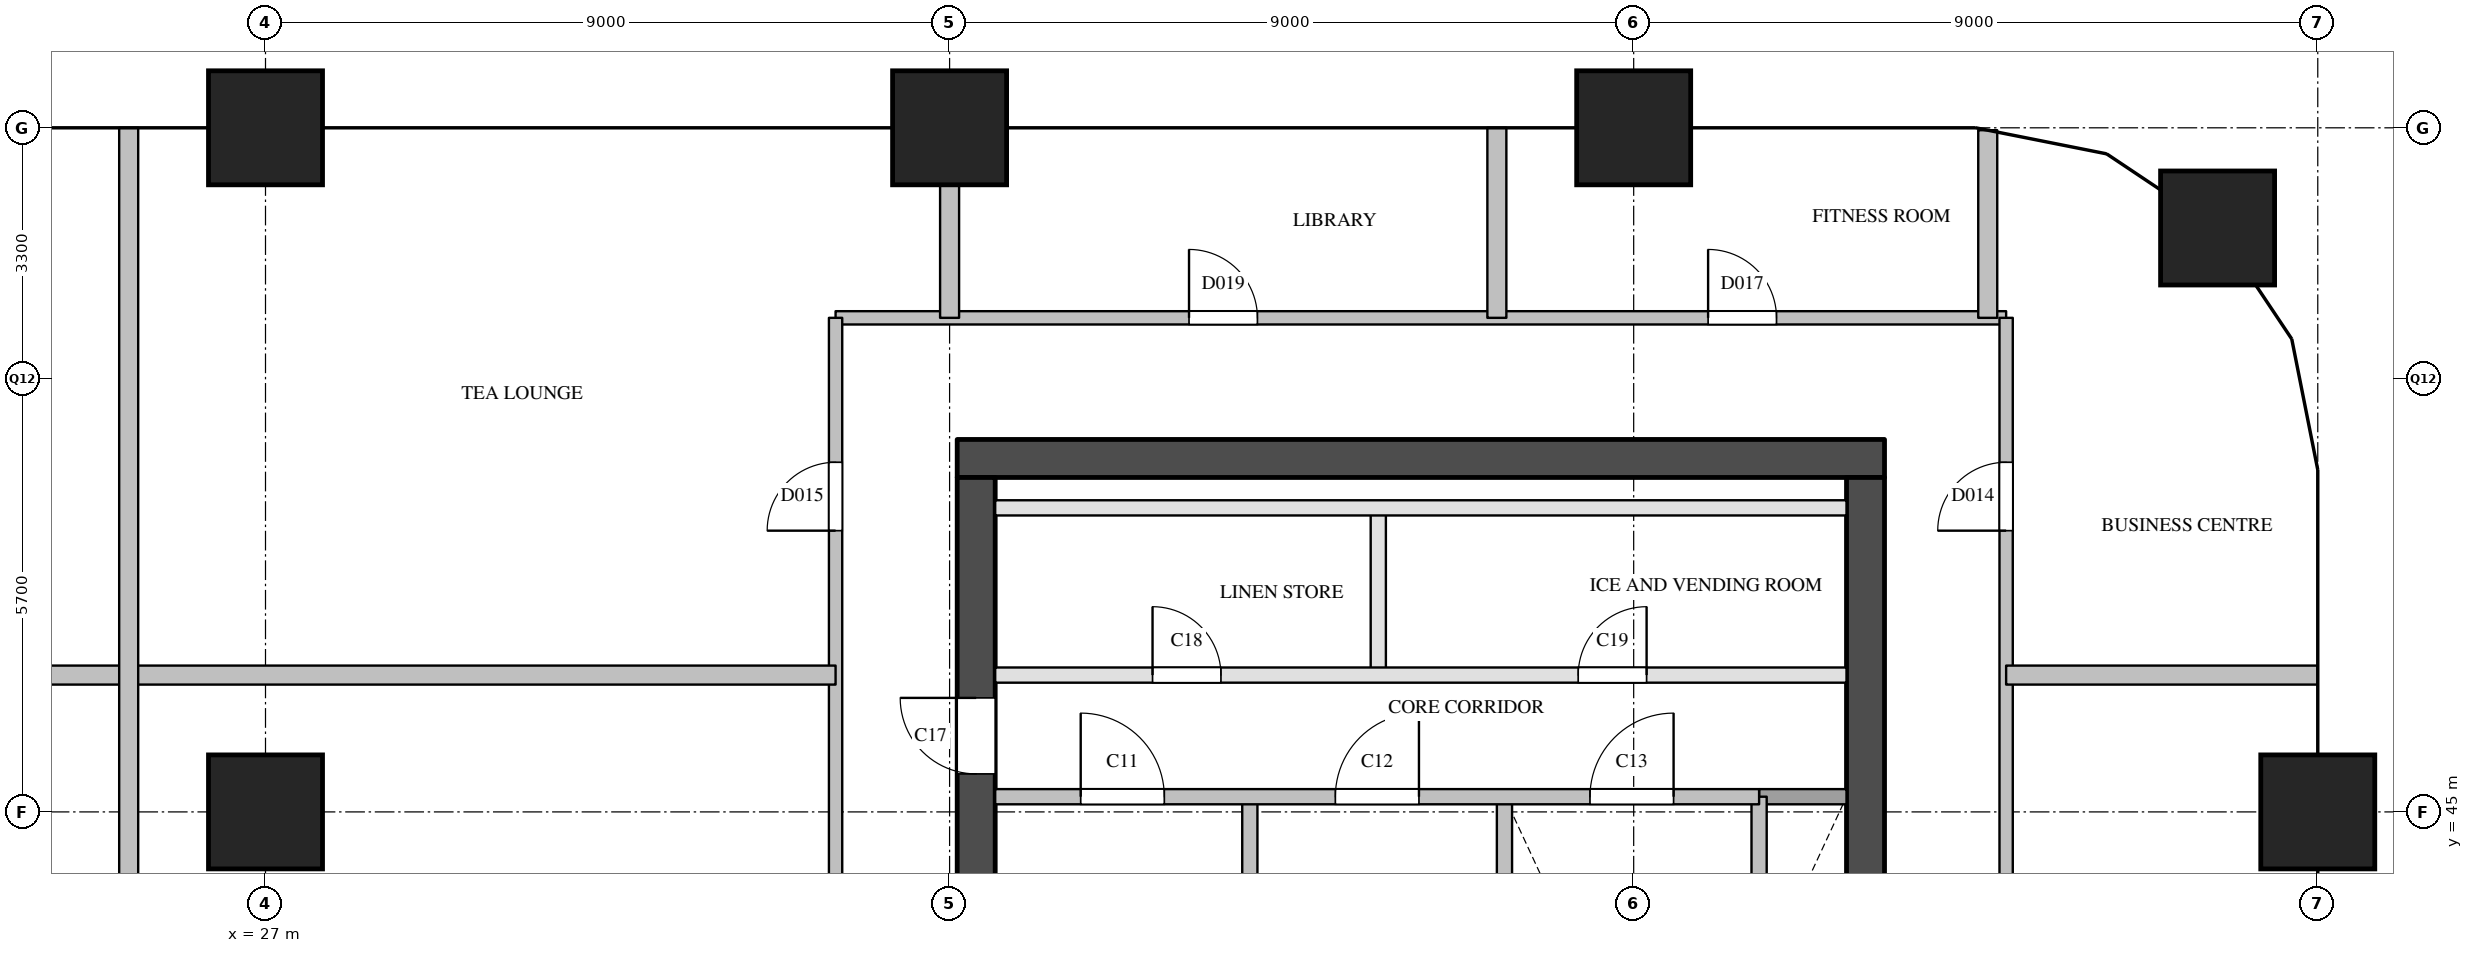
"""IFC4 building model, lengths in metres.
Left out: names, types, materials, properties, quantities, classifications, styles, units other than length and angle.
Written with IfcOpenShell. Run it as: python <this file> out.ifc"""

import sys

from ifc_helpers import new_model, si_unit, direction, frame, frame_2d, origin, origin_2d, place, context, subcontext, project, spatial, rectangle, extrude, element, fill, save


model = new_model("IFC4")
c1 = context("Model", 3, precision=1e-05, world=origin(), true_north=direction((0.0, 1.0)))
c2 = subcontext(c1, "Body", "Model", "MODEL_VIEW")
j1 = project(units=[si_unit("LENGTHUNIT", "METRE"), si_unit("PLANEANGLEUNIT", "RADIAN")], contexts=[c1])
p1 = place(None, origin())
s1 = spatial("IfcSite", under=j1, at=p1, CompositionType="ELEMENT")
p2 = place(p1, origin())
s2 = spatial("IfcBuilding", under=s1, at=p2, CompositionType="ELEMENT")
p3 = place(p2, frame((0.0, 0.0, 146.6)))
s3 = spatial("IfcBuildingStorey", under=s2, at=p3, CompositionType="ELEMENT", Elevation=146.6)
for number, where, z_axis, x_axis in (
    (1, (27.0, 45.0, 0.0), (0.0, 0.0, 1.0), (1.0, 0.0, 0.0)),
    (2, (27.0, 54.0, 0.0), (0.0, 0.0, 1.0), (1.0, 0.0, 0.0)),
    (3, (36.0, 54.0, 0.0), (0.0, 0.0, 1.0), (1.0, 0.0, 0.0)),
    (4, (45.0, 54.0, 0.0), (0.0, 0.0, 1.0), (1.0, 0.0, 0.0)),
    (5, (54.0, 45.0, 0.0), (0.0, 0.0, 1.0), (1.0, 0.0, 0.0)),
    (6, (52.682, 52.682, 0.0), (0.0, 0.0, 1.0), (1.0, 0.0, 0.0)),
):
    element("IfcColumn", number, at=place(p3, frame(where, z_axis=z_axis, x_axis=x_axis)), inside=s3, PredefinedType="COLUMN", context=c2, shape_type="SweptSolid", body=[
        extrude(rectangle(XDim=1.5, YDim=1.5, at=origin_2d()), origin(), (0.0, 0.0, 1.0), 3.9),
    ])
p4 = place(p3, frame((36.1, 49.65, 0.0), z_axis=(0.0, 0.0, 1.0), x_axis=(1.0, 0.0, 0.0)))
e7 = element("IfcWall", 7, at=p4, inside=s3, PredefinedType="SHEAR", context=c2, shape_type="SweptSolid", body=[
    extrude(rectangle(XDim=12.2, YDim=0.5, at=frame_2d((6.1, 0.0))), origin(), (0.0, 0.0, 1.0), 3.6),
])
p5 = place(p3, frame((36.35, 29.1, 0.0), z_axis=(0.0, 0.0, 1.0), x_axis=(0.0, 1.0, 0.0)))
e8 = element("IfcWall", 8, at=p5, inside=s3, PredefinedType="SHEAR", context=c2, shape_type="SweptSolid", body=[
    extrude(rectangle(XDim=20.3, YDim=0.5, at=frame_2d((10.15, 0.0))), origin(), (0.0, 0.0, 1.0), 3.6),
])
p6 = place(p5, frame((3.6, 0.0, 0.0)))
e9 = element("IfcOpeningElement", 9, at=p6, cuts=e8, PredefinedType="OPENING", context=c2, shape_type="SweptSolid", body=[
    extrude(rectangle(XDim=1.8, YDim=2.1, at=frame_2d((0.9, 1.05))), frame((0.0, 0.26, 0.0), z_axis=(0.0, -1.0, 0.0), x_axis=(1.0, 0.0, 0.0)), (0.0, 0.0, 1.0), 0.52),
])
p7 = place(p5, frame((16.4, 0.0, 0.0)))
e10 = element("IfcOpeningElement", 10, at=p7, cuts=e8, PredefinedType="OPENING", context=c2, shape_type="SweptSolid", body=[
    extrude(rectangle(XDim=1.0, YDim=2.1, at=frame_2d((0.5, 1.05))), frame((0.0, 0.26, 0.0), z_axis=(0.0, -1.0, 0.0), x_axis=(1.0, 0.0, 0.0)), (0.0, 0.0, 1.0), 0.52),
])
p8 = place(p3, frame((48.05, 29.1, 0.0), z_axis=(0.0, 0.0, 1.0), x_axis=(0.0, 1.0, 0.0)))
e11 = element("IfcWall", 11, at=p8, inside=s3, PredefinedType="SHEAR", context=c2, shape_type="SweptSolid", body=[
    extrude(rectangle(XDim=20.3, YDim=0.5, at=frame_2d((10.15, 0.0))), origin(), (0.0, 0.0, 1.0), 3.6),
])
p9 = place(p8, frame((12.5, 0.0, 0.0)))
e12 = element("IfcOpeningElement", 12, at=p9, cuts=e11, PredefinedType="OPENING", context=c2, shape_type="SweptSolid", body=[
    extrude(rectangle(XDim=0.7, YDim=2.1, at=frame_2d((0.35, 1.05))), frame((0.0, 0.26, 0.0), z_axis=(0.0, -1.0, 0.0), x_axis=(1.0, 0.0, 0.0)), (0.0, 0.0, 1.0), 0.52),
])
p10 = place(p8, frame((3.9, 0.0, 0.0)))
e13 = element("IfcOpeningElement", 13, at=p10, cuts=e11, PredefinedType="OPENING", context=c2, shape_type="SweptSolid", body=[
    extrude(rectangle(XDim=1.8, YDim=2.1, at=frame_2d((0.9, 1.05))), frame((0.0, 0.26, 0.0), z_axis=(0.0, -1.0, 0.0), x_axis=(1.0, 0.0, 0.0)), (0.0, 0.0, 1.0), 0.52),
])
p11 = place(p3, frame((39.95, 40.78, 0.0), z_axis=(0.0, 0.0, 1.0), x_axis=(0.0, 1.0, 0.0)))
e14 = element("IfcWall", 14, at=p11, inside=s3, PredefinedType="SOLIDWALL", context=c2, shape_type="SweptSolid", body=[
    extrude(rectangle(XDim=4.42, YDim=0.2, at=frame_2d((2.21, 0.0))), origin(), (0.0, 0.0, 1.0), 3.6),
])
p12 = place(p3, frame((41.64, 46.8, 0.0), z_axis=(0.0, 0.0, 1.0), x_axis=(0.0, 1.0, 0.0)))
e15 = element("IfcWall", 15, at=p12, inside=s3, PredefinedType="PARTITIONING", context=c2, shape_type="SweptSolid", body=[
    extrude(rectangle(XDim=2.2, YDim=0.2, at=frame_2d((1.1, 0.0))), origin(), (0.0, 0.0, 1.0), 3.6),
])
for number, where, z_axis, x_axis in (
    (16, (43.3, 40.78, 0.0), (0.0, 0.0, 1.0), (0.0, 1.0, 0.0)),
    (17, (46.65, 40.78, 0.0), (0.0, 0.0, 1.0), (0.0, 1.0, 0.0)),
):
    element("IfcWall", number, at=place(p3, frame(where, z_axis=z_axis, x_axis=x_axis)), inside=s3, PredefinedType="SOLIDWALL", context=c2, shape_type="SweptSolid", body=[
        extrude(rectangle(XDim=4.42, YDim=0.2, at=frame_2d((2.21, 0.0))), origin(), (0.0, 0.0, 1.0), 3.6),
    ])
p13 = place(p3, frame((46.65, 45.2, 0.0), z_axis=(0.0, 0.0, 1.0), x_axis=(1.0, 0.0, 0.0)))
e18 = element("IfcWall", 18, at=p13, inside=s3, PredefinedType="SOLIDWALL", context=c2, shape_type="SweptSolid", body=[
    extrude(rectangle(XDim=1.15, YDim=0.2, at=frame_2d((0.575, 0.0))), origin(), (0.0, 0.0, 1.0), 3.6),
])
p14 = place(p3, frame((36.6, 45.2, 0.0), z_axis=(0.0, 0.0, 1.0), x_axis=(1.0, 0.0, 0.0)))
e19 = element("IfcWall", 19, at=p14, inside=s3, PredefinedType="SOLIDWALL", context=c2, shape_type="SweptSolid", body=[
    extrude(rectangle(XDim=10.05, YDim=0.2, at=frame_2d((5.025, 0.0))), origin(), (0.0, 0.0, 1.0), 3.6),
])
p15 = place(p14, frame((1.125, 0.0, 0.0)))
e20 = element("IfcOpeningElement", 20, at=p15, cuts=e19, PredefinedType="OPENING", context=c2, shape_type="SweptSolid", body=[
    extrude(rectangle(XDim=1.1, YDim=2.1, at=frame_2d((0.55, 1.05))), frame((0.0, 0.11, 0.0), z_axis=(0.0, -1.0, 0.0), x_axis=(1.0, 0.0, 0.0)), (0.0, 0.0, 1.0), 0.22),
])
p16 = place(p14, frame((4.475, 0.0, 0.0)))
e21 = element("IfcOpeningElement", 21, at=p16, cuts=e19, PredefinedType="OPENING", context=c2, shape_type="SweptSolid", body=[
    extrude(rectangle(XDim=1.1, YDim=2.1, at=frame_2d((0.55, 1.05))), frame((0.0, 0.11, 0.0), z_axis=(0.0, -1.0, 0.0), x_axis=(1.0, 0.0, 0.0)), (0.0, 0.0, 1.0), 0.22),
])
p17 = place(p14, frame((7.825, 0.0, 0.0)))
e22 = element("IfcOpeningElement", 22, at=p17, cuts=e19, PredefinedType="OPENING", context=c2, shape_type="SweptSolid", body=[
    extrude(rectangle(XDim=1.1, YDim=2.1, at=frame_2d((0.55, 1.05))), frame((0.0, 0.11, 0.0), z_axis=(0.0, -1.0, 0.0), x_axis=(1.0, 0.0, 0.0)), (0.0, 0.0, 1.0), 0.22),
])
p18 = place(p3, frame((36.6, 46.8, 0.0), z_axis=(0.0, 0.0, 1.0), x_axis=(1.0, 0.0, 0.0)))
e23 = element("IfcWall", 23, at=p18, inside=s3, PredefinedType="PARTITIONING", context=c2, shape_type="SweptSolid", body=[
    extrude(rectangle(XDim=11.2, YDim=0.2, at=frame_2d((5.6, 0.0))), origin(), (0.0, 0.0, 1.0), 3.6),
])
p19 = place(p18, frame((2.07, 0.0, 0.0)))
e24 = element("IfcOpeningElement", 24, at=p19, cuts=e23, PredefinedType="OPENING", context=c2, shape_type="SweptSolid", body=[
    extrude(rectangle(XDim=0.9, YDim=2.1, at=frame_2d((0.45, 1.05))), frame((0.0, 0.11, 0.0), z_axis=(0.0, -1.0, 0.0), x_axis=(1.0, 0.0, 0.0)), (0.0, 0.0, 1.0), 0.22),
])
p20 = place(p18, frame((7.67, 0.0, 0.0)))
e25 = element("IfcOpeningElement", 25, at=p20, cuts=e23, PredefinedType="OPENING", context=c2, shape_type="SweptSolid", body=[
    extrude(rectangle(XDim=0.9, YDim=2.1, at=frame_2d((0.45, 1.05))), frame((0.0, 0.11, 0.0), z_axis=(0.0, -1.0, 0.0), x_axis=(1.0, 0.0, 0.0)), (0.0, 0.0, 1.0), 0.22),
])
p21 = place(p3, frame((36.6, 49.0, 0.0), z_axis=(0.0, 0.0, 1.0), x_axis=(1.0, 0.0, 0.0)))
e26 = element("IfcWall", 26, at=p21, inside=s3, PredefinedType="PARTITIONING", context=c2, shape_type="SweptSolid", body=[
    extrude(rectangle(XDim=11.2, YDim=0.2, at=frame_2d((5.6, 0.0))), origin(), (0.0, 0.0, 1.0), 3.6),
])
p22 = place(p3, frame((34.5, 51.5, 0.0), z_axis=(0.0, 0.0, 1.0), x_axis=(1.0, 0.0, 0.0)))
e27 = element("IfcWall", 27, at=p22, inside=s3, PredefinedType="PARTITIONING", context=c2, shape_type="SweptSolid", body=[
    extrude(rectangle(XDim=15.4, YDim=0.175, at=frame_2d((7.7, 0.0))), origin(), (0.0, 0.0, 1.0), 3.6),
])
p23 = place(p22, frame((11.479, 0.0, 0.0)))
e28 = element("IfcOpeningElement", 28, at=p23, cuts=e27, PredefinedType="OPENING", context=c2, shape_type="SweptSolid", body=[
    extrude(rectangle(XDim=0.9, YDim=2.1, at=frame_2d((0.45, 1.05))), frame((0.0, 0.097, 0.0), z_axis=(0.0, -1.0, 0.0), x_axis=(1.0, 0.0, 0.0)), (0.0, 0.0, 1.0), 0.195),
])
p24 = place(p22, frame((4.65, 0.0, 0.0)))
e29 = element("IfcOpeningElement", 29, at=p24, cuts=e27, PredefinedType="OPENING", context=c2, shape_type="SweptSolid", body=[
    extrude(rectangle(XDim=0.9, YDim=2.1, at=frame_2d((0.45, 1.05))), frame((0.0, 0.097, 0.0), z_axis=(0.0, -1.0, 0.0), x_axis=(1.0, 0.0, 0.0)), (0.0, 0.0, 1.0), 0.195),
])
p25 = place(p3, frame((34.5, 38.7, 0.0), z_axis=(0.0, 0.0, 1.0), x_axis=(0.0, 1.0, 0.0)))
e30 = element("IfcWall", 30, at=p25, inside=s3, PredefinedType="PARTITIONING", context=c2, shape_type="SweptSolid", body=[
    extrude(rectangle(XDim=12.8, YDim=0.175, at=frame_2d((6.4, 0.0))), origin(), (0.0, 0.0, 1.0), 3.6),
])
p26 = place(p25, frame((10.0, 0.0, 0.0)))
e31 = element("IfcOpeningElement", 31, at=p26, cuts=e30, PredefinedType="OPENING", context=c2, shape_type="SweptSolid", body=[
    extrude(rectangle(XDim=0.9, YDim=2.1, at=frame_2d((0.45, 1.05))), frame((0.0, 0.097, 0.0), z_axis=(0.0, -1.0, 0.0), x_axis=(1.0, 0.0, 0.0)), (0.0, 0.0, 1.0), 0.195),
])
p27 = place(p3, frame((49.9, 28.5, 0.0), z_axis=(0.0, 0.0, 1.0), x_axis=(0.0, 1.0, 0.0)))
e32 = element("IfcWall", 32, at=p27, inside=s3, PredefinedType="PARTITIONING", context=c2, shape_type="SweptSolid", body=[
    extrude(rectangle(XDim=23.0, YDim=0.175, at=frame_2d((11.5, 0.0))), origin(), (0.0, 0.0, 1.0), 3.6),
])
p28 = place(p27, frame((3.3, 0.0, 0.0)))
e33 = element("IfcOpeningElement", 33, at=p28, cuts=e32, PredefinedType="OPENING", context=c2, shape_type="SweptSolid", body=[
    extrude(rectangle(XDim=0.9, YDim=2.1, at=frame_2d((0.45, 1.05))), frame((0.0, 0.097, 0.0), z_axis=(0.0, -1.0, 0.0), x_axis=(1.0, 0.0, 0.0)), (0.0, 0.0, 1.0), 0.195),
])
p29 = place(p27, frame((12.45, 0.0, 0.0)))
e34 = element("IfcOpeningElement", 34, at=p29, cuts=e32, PredefinedType="OPENING", context=c2, shape_type="SweptSolid", body=[
    extrude(rectangle(XDim=0.9, YDim=2.1, at=frame_2d((0.45, 1.05))), frame((0.0, 0.097, 0.0), z_axis=(0.0, -1.0, 0.0), x_axis=(1.0, 0.0, 0.0)), (0.0, 0.0, 1.0), 0.195),
])
p30 = place(p27, frame((20.2, 0.0, 0.0)))
e35 = element("IfcOpeningElement", 35, at=p30, cuts=e32, PredefinedType="OPENING", context=c2, shape_type="SweptSolid", body=[
    extrude(rectangle(XDim=0.9, YDim=2.1, at=frame_2d((0.45, 1.05))), frame((0.0, 0.097, 0.0), z_axis=(0.0, -1.0, 0.0), x_axis=(1.0, 0.0, 0.0)), (0.0, 0.0, 1.0), 0.195),
])
p31 = place(p3, frame((19.5, 46.8, 0.0), z_axis=(0.0, 0.0, 1.0), x_axis=(1.0, 0.0, 0.0)))
e36 = element("IfcWall", 36, at=p31, inside=s3, PredefinedType="PARTITIONING", context=c2, shape_type="SweptSolid", body=[
    extrude(rectangle(XDim=15.0, YDim=0.25, at=frame_2d((7.5, 0.0))), origin(), (0.0, 0.0, 1.0), 2.6),
])
p32 = place(p3, frame((49.9, 46.8, 0.0), z_axis=(0.0, 0.0, 1.0), x_axis=(1.0, 0.0, 0.0)))
e37 = element("IfcWall", 37, at=p32, inside=s3, PredefinedType="PARTITIONING", context=c2, shape_type="SweptSolid", body=[
    extrude(rectangle(XDim=4.1, YDim=0.25, at=frame_2d((2.05, 0.0))), origin(), (0.0, 0.0, 1.0), 2.6),
])
p33 = place(p3, frame((25.2, 38.7, 0.0), z_axis=(0.0, 0.0, 1.0), x_axis=(0.0, 1.0, 0.0)))
e38 = element("IfcWall", 38, at=p33, inside=s3, PredefinedType="PARTITIONING", context=c2, shape_type="SweptSolid", body=[
    extrude(rectangle(XDim=15.3, YDim=0.25, at=frame_2d((7.65, 0.0))), origin(), (0.0, 0.0, 1.0), 2.6),
])
p34 = place(p3, frame((36.0, 51.5, 0.0), z_axis=(0.0, 0.0, 1.0), x_axis=(0.0, 1.0, 0.0)))
e39 = element("IfcWall", 39, at=p34, inside=s3, PredefinedType="PARTITIONING", context=c2, shape_type="SweptSolid", body=[
    extrude(rectangle(XDim=2.5, YDim=0.25, at=frame_2d((1.25, 0.0))), origin(), (0.0, 0.0, 1.0), 3.6),
])
p35 = place(p3, frame((43.2, 51.5, 0.0), z_axis=(0.0, 0.0, 1.0), x_axis=(0.0, 1.0, 0.0)))
e40 = element("IfcWall", 40, at=p35, inside=s3, PredefinedType="PARTITIONING", context=c2, shape_type="SweptSolid", body=[
    extrude(rectangle(XDim=2.5, YDim=0.25, at=frame_2d((1.25, 0.0))), origin(), (0.0, 0.0, 1.0), 2.6),
])
p36 = place(p3, frame((49.658, 51.5, 0.0), z_axis=(0.0, 0.0, 1.0), x_axis=(0.0, 1.0, 0.0)))
e41 = element("IfcWall", 41, at=p36, inside=s3, PredefinedType="PARTITIONING", context=c2, shape_type="SweptSolid", body=[
    extrude(rectangle(XDim=2.469, YDim=0.25, at=frame_2d((1.234, 0.0))), origin(), (0.0, 0.0, 1.0), 2.6),
])
p37 = place(p15, origin())
e42 = element("IfcDoor", 42, at=p37, inside=s3, OperationType="SINGLE_SWING_LEFT", PredefinedType="DOOR", context=c2, shape_type="SweptSolid", body=[
    extrude(rectangle(XDim=1.1, YDim=2.1, at=frame_2d((0.55, 1.05))), frame((0.0, 0.025, 0.0), z_axis=(0.0, -1.0, 0.0), x_axis=(1.0, 0.0, 0.0)), (0.0, 0.0, 1.0), 0.05),
])
fill(e20, e42)
p38 = place(p16, origin())
e43 = element("IfcDoor", 43, at=p38, inside=s3, OperationType="SINGLE_SWING_RIGHT", PredefinedType="DOOR", context=c2, shape_type="SweptSolid", body=[
    extrude(rectangle(XDim=1.1, YDim=2.1, at=frame_2d((0.55, 1.05))), frame((0.0, 0.025, 0.0), z_axis=(0.0, -1.0, 0.0), x_axis=(1.0, 0.0, 0.0)), (0.0, 0.0, 1.0), 0.05),
])
fill(e21, e43)
p39 = place(p17, origin())
e44 = element("IfcDoor", 44, at=p39, inside=s3, OperationType="SINGLE_SWING_RIGHT", PredefinedType="DOOR", context=c2, shape_type="SweptSolid", body=[
    extrude(rectangle(XDim=1.1, YDim=2.1, at=frame_2d((0.55, 1.05))), frame((0.0, 0.025, 0.0), z_axis=(0.0, -1.0, 0.0), x_axis=(1.0, 0.0, 0.0)), (0.0, 0.0, 1.0), 0.05),
])
fill(e22, e44)
p40 = place(p7, origin())
e45 = element("IfcDoor", 45, at=p40, inside=s3, OperationType="SINGLE_SWING_RIGHT", PredefinedType="DOOR", context=c2, shape_type="SweptSolid", body=[
    extrude(rectangle(XDim=1.0, YDim=2.1, at=frame_2d((0.5, 1.05))), frame((0.0, 0.025, 0.0), z_axis=(0.0, -1.0, 0.0), x_axis=(1.0, 0.0, 0.0)), (0.0, 0.0, 1.0), 0.05),
])
fill(e10, e45)
p41 = place(p19, origin())
e46 = element("IfcDoor", 46, at=p41, inside=s3, OperationType="SINGLE_SWING_LEFT", PredefinedType="DOOR", context=c2, shape_type="SweptSolid", body=[
    extrude(rectangle(XDim=0.9, YDim=2.1, at=frame_2d((0.45, 1.05))), frame((0.0, 0.025, 0.0), z_axis=(0.0, -1.0, 0.0), x_axis=(1.0, 0.0, 0.0)), (0.0, 0.0, 1.0), 0.05),
])
fill(e24, e46)
p42 = place(p20, origin())
e47 = element("IfcDoor", 47, at=p42, inside=s3, OperationType="SINGLE_SWING_RIGHT", PredefinedType="DOOR", context=c2, shape_type="SweptSolid", body=[
    extrude(rectangle(XDim=0.9, YDim=2.1, at=frame_2d((0.45, 1.05))), frame((0.0, 0.025, 0.0), z_axis=(0.0, -1.0, 0.0), x_axis=(1.0, 0.0, 0.0)), (0.0, 0.0, 1.0), 0.05),
])
fill(e25, e47)
p43 = place(p30, origin())
e48 = element("IfcDoor", 48, at=p43, inside=s3, OperationType="SINGLE_SWING_LEFT", PredefinedType="DOOR", context=c2, shape_type="SweptSolid", body=[
    extrude(rectangle(XDim=0.9, YDim=2.1, at=frame_2d((0.45, 1.05))), frame((0.0, 0.025, 0.0), z_axis=(0.0, -1.0, 0.0), x_axis=(1.0, 0.0, 0.0)), (0.0, 0.0, 1.0), 0.05),
])
fill(e35, e48)
p44 = place(p26, origin())
e49 = element("IfcDoor", 49, at=p44, inside=s3, OperationType="SINGLE_SWING_LEFT", PredefinedType="DOOR", context=c2, shape_type="SweptSolid", body=[
    extrude(rectangle(XDim=0.9, YDim=2.1, at=frame_2d((0.45, 1.05))), frame((0.0, 0.025, 0.0), z_axis=(0.0, -1.0, 0.0), x_axis=(1.0, 0.0, 0.0)), (0.0, 0.0, 1.0), 0.05),
])
fill(e31, e49)
p45 = place(p23, origin())
e50 = element("IfcDoor", 50, at=p45, inside=s3, OperationType="SINGLE_SWING_LEFT", PredefinedType="DOOR", context=c2, shape_type="SweptSolid", body=[
    extrude(rectangle(XDim=0.9, YDim=2.1, at=frame_2d((0.45, 1.05))), frame((0.0, 0.025, 0.0), z_axis=(0.0, -1.0, 0.0), x_axis=(1.0, 0.0, 0.0)), (0.0, 0.0, 1.0), 0.05),
])
fill(e28, e50)
p46 = place(p24, origin())
e51 = element("IfcDoor", 51, at=p46, inside=s3, OperationType="SINGLE_SWING_LEFT", PredefinedType="DOOR", context=c2, shape_type="SweptSolid", body=[
    extrude(rectangle(XDim=0.9, YDim=2.1, at=frame_2d((0.45, 1.05))), frame((0.0, 0.025, 0.0), z_axis=(0.0, -1.0, 0.0), x_axis=(1.0, 0.0, 0.0)), (0.0, 0.0, 1.0), 0.05),
])
fill(e29, e51)
save(model, sys.argv[1])
